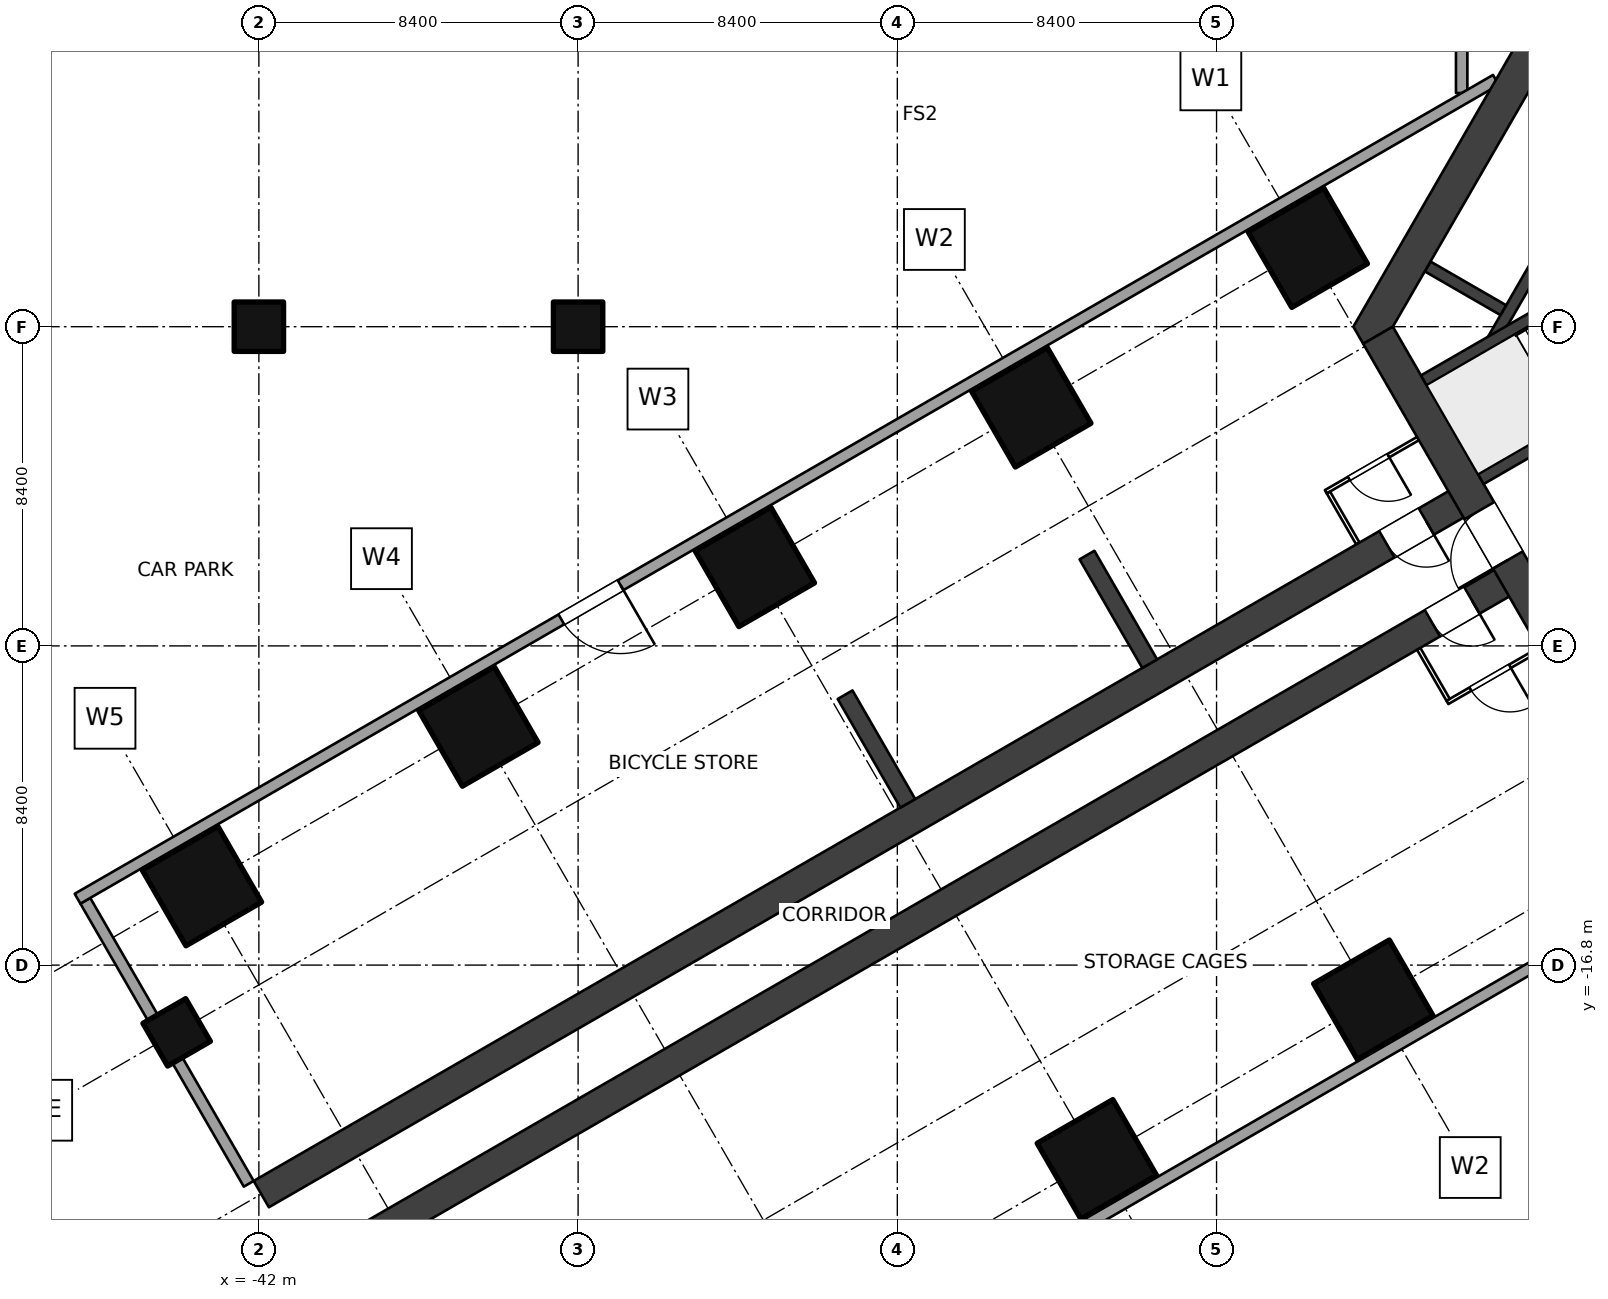
"""IFC4 building model, lengths in metres.
Left out: names, types, materials, properties, quantities, classifications, styles, units other than length and angle.
Written with IfcOpenShell. Run it as: python <this file> out.ifc"""

import sys

from ifc_helpers import new_model, si_unit, direction, frame, frame_2d, origin, origin_2d, place, context, subcontext, project, spatial, polyline, rectangle, outline, extrude, element, fill, save


model = new_model("IFC4")
c1 = context("Model", 3, precision=1e-05, world=origin(), true_north=direction((0.0, 1.0)))
c2 = subcontext(c1, "Body", "Model", "MODEL_VIEW")
j1 = project(units=[si_unit("LENGTHUNIT", "METRE"), si_unit("PLANEANGLEUNIT", "RADIAN")], contexts=[c1])
p1 = place(None, origin())
s1 = spatial("IfcSite", under=j1, at=p1, CompositionType="ELEMENT")
p2 = place(p1, origin())
s2 = spatial("IfcBuilding", under=s1, at=p2, CompositionType="ELEMENT")
p3 = place(p2, frame((0.0, 0.0, -7.0)))
s3 = spatial("IfcBuildingStorey", under=s2, at=p3, CompositionType="ELEMENT", Elevation=-7.0)
for number, where, z_axis, x_axis in (
    (1, (-14.4, 2.078, 0.0), (0.0, 0.0, 1.0), (-0.5, 0.866, 0.0)),
    (2, (-12.675, -17.71, 0.0), (0.0, 0.0, 1.0), (-0.5, 0.866, 0.0)),
    (3, (-21.675, -2.122, 0.0), (0.0, 0.0, 1.0), (-0.5, 0.866, 0.0)),
    (4, (-19.949, -21.91, 0.0), (0.0, 0.0, 1.0), (-0.5, 0.866, 0.0)),
    (5, (-28.949, -6.322, 0.0), (0.0, 0.0, 1.0), (-0.5, 0.866, 0.0)),
    (6, (-36.224, -10.521, 0.0), (0.0, 0.0, 1.0), (-0.5, 0.866, 0.0)),
    (7, (-43.499, -14.721, 0.0), (0.0, 0.0, 1.0), (-0.5, 0.866, 0.0)),
):
    element("IfcColumn", number, at=place(p3, frame(where, z_axis=z_axis, x_axis=x_axis)), inside=s3, PredefinedType="COLUMN", context=c2, shape_type="SweptSolid", body=[
        extrude(rectangle(XDim=2.3, YDim=2.3, at=origin_2d()), origin(), (0.0, 0.0, 1.0), 3.5),
    ])
for number, where, z_axis, x_axis in (
    (8, (-44.164, -18.57, 0.0), (0.0, 0.0, 1.0), (-0.5, 0.866, 0.0)),
    (9, (-42.0, 0.0, 0.0), (0.0, 0.0, 1.0), (1.0, 0.0, 0.0)),
    (10, (-33.6, 0.0, 0.0), (0.0, 0.0, 1.0), (1.0, 0.0, 0.0)),
):
    element("IfcColumn", number, at=place(p3, frame(where, z_axis=z_axis, x_axis=x_axis)), inside=s3, PredefinedType="COLUMN", context=c2, shape_type="SweptSolid", body=[
        extrude(rectangle(XDim=1.3, YDim=1.3, at=origin_2d()), origin(), (0.0, 0.0, 1.0), 3.5),
    ])
p4 = place(p3, frame((-6.47, -10.757, 0.0), z_axis=(0.0, 0.0, 1.0), x_axis=(-0.499997612506, 0.8660267822, 0.0)))
e11 = element("IfcWall", 11, at=p4, inside=s3, PredefinedType="SHEAR", context=c2, shape_type="SweptSolid", body=[
    extrude(rectangle(XDim=12.161, YDim=0.9, at=frame_2d((6.08, 0.0))), origin(), (0.0, 0.0, 1.0), 3.5),
])
p5 = place(p4, frame((5.33, 0.0, 0.0)))
e12 = element("IfcOpeningElement", 12, at=p5, cuts=e11, PredefinedType="OPENING", context=c2, shape_type="SweptSolid", body=[
    extrude(rectangle(XDim=1.5, YDim=2.1, at=frame_2d((0.75, 1.05))), frame((0.0, 0.46, 0.0), z_axis=(0.0, -1.0, 0.0), x_axis=(1.0, 0.0, 0.0)), (0.0, 0.0, 1.0), 0.92),
])
p6 = place(p3, origin())
e13 = element("IfcWall", 13, at=p6, inside=s3, PredefinedType="SHEAR", context=c2, shape_type="SweptSolid", body=[
    extrude(outline(polyline([(-6.6, 11.432), (-13.2, 0.0), (-12.94, -0.45), (-12.161, 0.0), (-6.08, 10.531), (-6.08, 11.432), (-6.6, 11.432)])), origin(), (0.0, 0.0, 1.0), 3.5),
])
p7 = place(p3, frame((-3.869, -0.559, 0.0), z_axis=(0.0, 0.0, 1.0), x_axis=(-0.86602711848, -0.499997030048, 0.0)))
e14 = element("IfcWall", 14, at=p7, inside=s3, PredefinedType="SHEAR", context=c2, shape_type="SweptSolid", body=[
    extrude(rectangle(XDim=6.901, YDim=0.3, at=frame_2d((3.451, 0.0))), origin(), (0.0, 0.0, 1.0), 3.5),
])
p8 = place(p7, frame((0.25, 0.0, 0.0)))
e15 = element("IfcOpeningElement", 15, at=p8, cuts=e14, PredefinedType="OPENING", context=c2, shape_type="SweptSolid", body=[
    extrude(rectangle(XDim=1.0, YDim=2.1, at=frame_2d((0.5, 1.05))), frame((0.0, 0.16, 0.0), z_axis=(0.0, -1.0, 0.0), x_axis=(1.0, 0.0, 0.0)), (0.0, 0.0, 1.0), 0.32),
])
p9 = place(p3, frame((-5.369, 2.039, 0.0), z_axis=(0.0, 0.0, 1.0), x_axis=(-0.86602711848, -0.499997030048, 0.0)))
e16 = element("IfcWall", 16, at=p9, inside=s3, PredefinedType="SHEAR", context=c2, shape_type="SweptSolid", body=[
    extrude(rectangle(XDim=6.901, YDim=0.3, at=frame_2d((3.451, 0.0))), origin(), (0.0, 0.0, 1.0), 3.5),
])
p10 = place(p3, frame((-9.548, -0.374, 0.0), z_axis=(0.0, 0.0, 1.0), x_axis=(0.500002290144, 0.866024081565, 0.0)))
e17 = element("IfcWall", 17, at=p10, inside=s3, PredefinedType="SHEAR", context=c2, shape_type="SweptSolid", body=[
    extrude(rectangle(XDim=10.195, YDim=0.3, at=frame_2d((5.098, 0.0))), origin(), (0.0, 0.0, 1.0), 3.5),
])
p11 = place(p10, frame((4.648, 0.0, 0.0)))
e18 = element("IfcOpeningElement", 18, at=p11, cuts=e17, PredefinedType="OPENING", context=c2, shape_type="SweptSolid", body=[
    extrude(rectangle(XDim=0.9, YDim=2.1, at=frame_2d((0.45, 1.05))), frame((0.0, 0.16, 0.0), z_axis=(0.0, -1.0, 0.0), x_axis=(1.0, 0.0, 0.0)), (0.0, 0.0, 1.0), 0.32),
])
p12 = place(p3, frame((-9.254, 0.435, 0.0), z_axis=(0.0, 0.0, 1.0), x_axis=(-0.866007057882, 0.500031774688, 0.0)))
e19 = element("IfcWall", 19, at=p12, inside=s3, PredefinedType="SHEAR", context=c2, shape_type="SweptSolid", body=[
    extrude(rectangle(XDim=2.3, YDim=0.3, at=frame_2d((1.15, 0.0))), origin(), (0.0, 0.0, 1.0), 3.5),
])
p13 = place(p3, frame((-8.91, -6.53, 0.0), z_axis=(0.0, 0.0, 1.0), x_axis=(-0.866025284237, -0.500000207062, 0.0)))
e20 = element("IfcWall", 20, at=p13, inside=s3, PredefinedType="SHEAR", context=c2, shape_type="SweptSolid", body=[
    extrude(rectangle(XDim=36.75, YDim=0.8, at=frame_2d((18.375, 0.0))), origin(), (0.0, 0.0, 1.0), 3.5),
])
p14 = place(p13, frame((1.35, 0.0, 0.0)))
e21 = element("IfcOpeningElement", 21, at=p14, cuts=e20, PredefinedType="OPENING", context=c2, shape_type="SweptSolid", body=[
    extrude(rectangle(XDim=1.2, YDim=2.1, at=frame_2d((0.6, 1.05))), frame((0.0, 0.41, 0.0), z_axis=(0.0, -1.0, 0.0), x_axis=(1.0, 0.0, 0.0)), (0.0, 0.0, 1.0), 0.82),
])
p15 = place(p3, frame((-10.11, -4.451, 0.0), z_axis=(0.0, 0.0, 1.0), x_axis=(-0.866025284237, -0.500000207062, 0.0)))
e22 = element("IfcWall", 22, at=p15, inside=s3, PredefinedType="SHEAR", context=c2, shape_type="SweptSolid", body=[
    extrude(rectangle(XDim=36.75, YDim=0.8, at=frame_2d((18.375, 0.0))), origin(), (0.0, 0.0, 1.0), 3.5),
])
p16 = place(p15, frame((1.35, 0.0, 0.0)))
e23 = element("IfcOpeningElement", 23, at=p16, cuts=e22, PredefinedType="OPENING", context=c2, shape_type="SweptSolid", body=[
    extrude(rectangle(XDim=1.2, YDim=2.1, at=frame_2d((0.6, 1.05))), frame((0.0, 0.41, 0.0), z_axis=(0.0, -1.0, 0.0), x_axis=(1.0, 0.0, 0.0)), (0.0, 0.0, 1.0), 0.82),
])
p17 = place(p3, frame((-8.3, -8.487, 0.0), z_axis=(0.0, 0.0, 1.0), x_axis=(-0.866034573852, -0.49998411664, 0.0)))
e24 = element("IfcWall", 24, at=p17, inside=s3, PredefinedType="PARTITIONING", context=c2, shape_type="SweptSolid", body=[
    extrude(rectangle(XDim=2.8, YDim=0.1, at=frame_2d((1.4, 0.0))), origin(), (0.0, 0.0, 1.0), 3.2),
])
p18 = place(p17, frame((0.9, 0.0, 0.0)))
e25 = element("IfcOpeningElement", 25, at=p18, cuts=e24, PredefinedType="OPENING", context=c2, shape_type="SweptSolid", body=[
    extrude(rectangle(XDim=1.2, YDim=2.1, at=frame_2d((0.6, 1.05))), frame((0.0, 0.06, 0.0), z_axis=(0.0, -1.0, 0.0), x_axis=(1.0, 0.0, 0.0)), (0.0, 0.0, 1.0), 0.12),
])
p19 = place(p3, frame((-11.482, -8.476, 0.0), z_axis=(0.0, 0.0, 1.0), x_axis=(0.500017819788, -0.86601511528, 0.0)))
e26 = element("IfcWall", 26, at=p19, inside=s3, PredefinedType="PARTITIONING", context=c2, shape_type="SweptSolid", body=[
    extrude(rectangle(XDim=1.55, YDim=0.1, at=frame_2d((0.775, 0.0))), origin(), (0.0, 0.0, 1.0), 3.2),
])
p20 = place(p3, frame((-11.5, -2.945, 0.0), z_axis=(0.0, 0.0, 1.0), x_axis=(-0.866034573852, -0.49998411664, 0.0)))
e27 = element("IfcWall", 27, at=p20, inside=s3, PredefinedType="PARTITIONING", context=c2, shape_type="SweptSolid", body=[
    extrude(rectangle(XDim=2.8, YDim=0.1, at=frame_2d((1.4, 0.0))), origin(), (0.0, 0.0, 1.0), 3.2),
])
p21 = place(p20, frame((0.9, 0.0, 0.0)))
e28 = element("IfcOpeningElement", 28, at=p21, cuts=e27, PredefinedType="OPENING", context=c2, shape_type="SweptSolid", body=[
    extrude(rectangle(XDim=1.2, YDim=2.1, at=frame_2d((0.6, 1.05))), frame((0.0, 0.06, 0.0), z_axis=(0.0, -1.0, 0.0), x_axis=(1.0, 0.0, 0.0)), (0.0, 0.0, 1.0), 0.12),
])
p22 = place(p3, frame((-13.082, -5.705, 0.0), z_axis=(0.0, 0.0, 1.0), x_axis=(-0.500086022567, 0.865975732936, 0.0)))
e29 = element("IfcWall", 29, at=p22, inside=s3, PredefinedType="PARTITIONING", context=c2, shape_type="SweptSolid", body=[
    extrude(rectangle(XDim=1.55, YDim=0.1, at=frame_2d((0.775, 0.0))), origin(), (0.0, 0.0, 1.0), 3.2),
])
p23 = place(p3, frame((-42.267, -22.555, 0.0), z_axis=(0.0, 0.0, 1.0), x_axis=(-0.500007509209, 0.866021068297, 0.0)))
e30 = element("IfcWall", 30, at=p23, inside=s3, PredefinedType="SOLIDWALL", context=c2, shape_type="SweptSolid", body=[
    extrude(rectangle(XDim=8.6, YDim=0.3, at=frame_2d((4.3, 0.0))), origin(), (0.0, 0.0, 1.0), 1.9),
])
p24 = place(p3, frame((-10.35, 6.149, 0.0), z_axis=(0.0, 0.0, 1.0), x_axis=(0.0, 1.0, 0.0)))
e31 = element("IfcWall", 31, at=p24, inside=s3, PredefinedType="SOLIDWALL", context=c2, shape_type="SweptSolid", body=[
    extrude(rectangle(XDim=41.883, YDim=0.3, at=frame_2d((20.941, 0.0))), origin(), (0.0, 0.0, 1.0), 3.2),
])
p25 = place(p24, frame((25.383, 0.0, 0.0)))
e32 = element("IfcOpeningElement", 32, at=p25, cuts=e31, PredefinedType="OPENING", context=c2, shape_type="SweptSolid", body=[
    extrude(rectangle(XDim=1.8, YDim=2.4, at=frame_2d((0.9, 1.2))), frame((0.0, 0.16, 0.0), z_axis=(0.0, -1.0, 0.0), x_axis=(1.0, 0.0, 0.0)), (0.0, 0.0, 1.0), 0.32),
])
p26 = place(p3, frame((-0.15, -12.038, 0.0), z_axis=(0.0, 0.0, 1.0), x_axis=(-0.866026292622, -0.499998460486, 0.0)))
e33 = element("IfcWall", 33, at=p26, inside=s3, PredefinedType="SOLIDWALL", context=c2, shape_type="SweptSolid", body=[
    extrude(rectangle(XDim=41.883, YDim=0.3, at=frame_2d((20.941, 0.0))), origin(), (0.0, 0.0, 1.0), 3.2),
])
p27 = place(p26, frame((25.383, 0.0, 0.0)))
e34 = element("IfcOpeningElement", 34, at=p27, cuts=e33, PredefinedType="OPENING", context=c2, shape_type="SweptSolid", body=[
    extrude(rectangle(XDim=1.8, YDim=2.4, at=frame_2d((0.9, 1.2))), frame((0.0, 0.16, 0.0), z_axis=(0.0, -1.0, 0.0), x_axis=(1.0, 0.0, 0.0)), (0.0, 0.0, 1.0), 0.32),
])
p28 = place(p3, frame((-9.45, 6.495, 0.0), z_axis=(0.0, 0.0, 1.0), x_axis=(-0.866025301493, -0.500000177174, 0.0)))
e35 = element("IfcWall", 35, at=p28, inside=s3, PredefinedType="SOLIDWALL", context=c2, shape_type="SweptSolid", body=[
    extrude(rectangle(XDim=43.095, YDim=0.3, at=frame_2d((21.548, 0.0))), origin(), (0.0, 0.0, 1.0), 3.2),
])
p29 = place(p28, frame((26.595, 0.0, 0.0)))
e36 = element("IfcOpeningElement", 36, at=p29, cuts=e35, PredefinedType="OPENING", context=c2, shape_type="SweptSolid", body=[
    extrude(rectangle(XDim=1.8, YDim=2.4, at=frame_2d((0.9, 1.2))), frame((0.0, 0.16, 0.0), z_axis=(0.0, -1.0, 0.0), x_axis=(1.0, 0.0, 0.0)), (0.0, 0.0, 1.0), 0.32),
])
for number, where, z_axis, x_axis in (
    (37, (-18.559, -8.868, 0.0), (0.0, 0.0, 1.0), (-0.5, 0.866, 0.0)),
    (38, (-24.925, -12.543, 0.0), (0.0, 0.0, 1.0), (-0.5, 0.866, 0.0)),
):
    element("IfcWall", number, at=place(p3, frame(where, z_axis=z_axis, x_axis=x_axis)), inside=s3, PredefinedType="SOLIDWALL", context=c2, shape_type="SweptSolid", body=[
        extrude(rectangle(XDim=3.3, YDim=0.45, at=frame_2d((1.65, 0.0))), origin(), (0.0, 0.0, 1.0), 3.5),
    ])
p30 = place(p5, origin())
e39 = element("IfcDoor", 39, at=p30, inside=s3, OperationType="DOUBLE_DOOR_DOUBLE_SWING", PredefinedType="DOOR", context=c2, shape_type="SweptSolid", body=[
    extrude(rectangle(XDim=1.5, YDim=2.1, at=frame_2d((0.75, 1.05))), frame((0.0, 0.025, 0.0), z_axis=(0.0, -1.0, 0.0), x_axis=(1.0, 0.0, 0.0)), (0.0, 0.0, 1.0), 0.05),
])
fill(e12, e39)
p31 = place(p14, origin())
e40 = element("IfcDoor", 40, at=p31, inside=s3, OperationType="DOUBLE_SWING_LEFT", PredefinedType="DOOR", context=c2, shape_type="SweptSolid", body=[
    extrude(rectangle(XDim=1.2, YDim=2.1, at=frame_2d((0.6, 1.05))), frame((0.0, 0.025, 0.0), z_axis=(0.0, -1.0, 0.0), x_axis=(1.0, 0.0, 0.0)), (0.0, 0.0, 1.0), 0.05),
])
fill(e21, e40)
p32 = place(p18, origin())
e41 = element("IfcDoor", 41, at=p32, inside=s3, OperationType="DOUBLE_SWING_LEFT", PredefinedType="DOOR", context=c2, shape_type="SweptSolid", body=[
    extrude(rectangle(XDim=1.2, YDim=2.1, at=frame_2d((0.6, 1.05))), frame((0.0, 0.025, 0.0), z_axis=(0.0, -1.0, 0.0), x_axis=(1.0, 0.0, 0.0)), (0.0, 0.0, 1.0), 0.05),
])
fill(e25, e41)
p33 = place(p16, origin())
e42 = element("IfcDoor", 42, at=p33, inside=s3, OperationType="DOUBLE_SWING_LEFT", PredefinedType="DOOR", context=c2, shape_type="SweptSolid", body=[
    extrude(rectangle(XDim=1.2, YDim=2.1, at=frame_2d((0.6, 1.05))), frame((0.0, 0.025, 0.0), z_axis=(0.0, -1.0, 0.0), x_axis=(1.0, 0.0, 0.0)), (0.0, 0.0, 1.0), 0.05),
])
fill(e23, e42)
p34 = place(p21, origin())
e43 = element("IfcDoor", 43, at=p34, inside=s3, OperationType="DOUBLE_SWING_LEFT", PredefinedType="DOOR", context=c2, shape_type="SweptSolid", body=[
    extrude(rectangle(XDim=1.2, YDim=2.1, at=frame_2d((0.6, 1.05))), frame((0.0, 0.025, 0.0), z_axis=(0.0, -1.0, 0.0), x_axis=(1.0, 0.0, 0.0)), (0.0, 0.0, 1.0), 0.05),
])
fill(e28, e43)
p35 = place(p29, origin())
e44 = element("IfcDoor", 44, at=p35, inside=s3, OperationType="DOUBLE_DOOR_DOUBLE_SWING", PredefinedType="DOOR", context=c2, shape_type="SweptSolid", body=[
    extrude(rectangle(XDim=1.8, YDim=2.4, at=frame_2d((0.9, 1.2))), frame((0.0, 0.025, 0.0), z_axis=(0.0, -1.0, 0.0), x_axis=(1.0, 0.0, 0.0)), (0.0, 0.0, 1.0), 0.05),
])
fill(e36, e44)
save(model, sys.argv[1])
